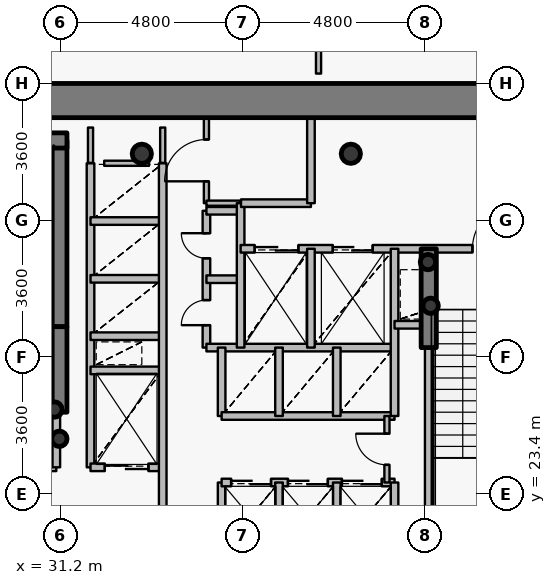
"""IFC4 building model, lengths in metres.
Left out: names, types, materials, properties, quantities, classifications, styles, units other than length and angle.
Written with IfcOpenShell. Run it as: python <this file> out.ifc"""

import sys

from ifc_helpers import new_model, si_unit, direction, frame, frame_2d, origin, origin_2d, place, context, subcontext, project, spatial, rectangle, hollow_circle, extrude, source, transform, mapped, element, fill, save


model = new_model("IFC4")
c1 = context("Model", 3, precision=1e-05, world=origin(), true_north=direction((0.0, 1.0)))
c2 = subcontext(c1, "Body", "Model", "MODEL_VIEW")
j1 = project(units=[si_unit("LENGTHUNIT", "METRE"), si_unit("PLANEANGLEUNIT", "RADIAN")], contexts=[c1])
p1 = place(None, origin())
s1 = spatial("IfcSite", under=j1, at=p1, CompositionType="ELEMENT")
p2 = place(p1, origin())
s2 = spatial("IfcBuilding", under=s1, at=p2, CompositionType="ELEMENT")
p3 = place(p2, frame((0.0, 0.0, 40.8)))
s3 = spatial("IfcBuildingStorey", under=s2, at=p3, CompositionType="ELEMENT", Elevation=40.8)
for number, where, z_axis, x_axis in (
    (1, (38.85, 32.35, 0.0), (0.0, 0.0, 1.0), (1.0, 0.0, 0.0)),
    (2, (33.35, 32.35, 0.0), (0.0, 0.0, 1.0), (1.0, 0.0, 0.0)),
):
    element("IfcColumn", number, at=place(p3, frame(where, z_axis=z_axis, x_axis=x_axis)), inside=s3, PredefinedType="COLUMN", context=c2, shape_type="SweptSolid", body=[
        extrude(hollow_circle(Radius=0.254, WallThickness=0.02, at=origin_2d()), origin(), (0.0, 0.0, 1.0), 4.2),
    ])
p4 = place(p3, frame((31.18, 27.8, 0.0), z_axis=(0.0, 0.0, 1.0), x_axis=(0.0, 1.0, 0.0)))
e3 = element("IfcWall", 3, at=p4, inside=s3, PredefinedType="SHEAR", context=c2, shape_type="SweptSolid", body=[
    extrude(rectangle(XDim=4.9, YDim=0.4, at=frame_2d((2.45, 0.0))), origin(), (0.0, 0.0, 1.0), 4.2),
])
p5 = place(p3, frame((27.28, 32.7, 0.0), z_axis=(0.0, 0.0, 1.0), x_axis=(1.0, 0.0, 0.0)))
e4 = element("IfcWall", 4, at=p5, inside=s3, PredefinedType="SHEAR", context=c2, shape_type="SweptSolid", body=[
    extrude(rectangle(XDim=4.1, YDim=0.4, at=frame_2d((2.05, 0.0))), origin(), (0.0, 0.0, 1.0), 4.2),
])
for number, where, z_axis, x_axis in (
    (5, (31.05, 25.62, 0.0), (0.0, 0.0, 1.0), (1.0, 0.0, 0.0)),
    (6, (31.18, 24.85, 0.0), (0.0, 0.0, 1.0), (1.0, 0.0, 0.0)),
    (7, (40.95, 28.35, 0.0), (0.0, 0.0, 1.0), (1.0, 0.0, 0.0)),
    (8, (40.88, 29.5, 0.0), (0.0, 0.0, 1.0), (1.0, 0.0, 0.0)),
):
    element("IfcColumn", number, at=place(p3, frame(where, z_axis=z_axis, x_axis=x_axis)), inside=s3, PredefinedType="COLUMN", context=c2, shape_type="SweptSolid", body=[
        extrude(hollow_circle(Radius=0.203, WallThickness=0.016, at=origin_2d()), origin(), (0.0, 0.0, 1.0), 4.2),
    ])
p6 = place(p3, frame((26.75, 33.75, 0.0), z_axis=(0.0, 0.0, 1.0), x_axis=(1.0, 0.0, 0.0)))
e9 = element("IfcWall", 9, at=p6, inside=s3, PredefinedType="SHEAR", context=c2, shape_type="SweptSolid", body=[
    extrude(rectangle(XDim=18.5, YDim=0.9, at=frame_2d((9.25, 0.0))), origin(), (0.0, 0.0, 1.0), 3.4),
])
p7 = place(p3, frame((31.18, 25.55, 0.0), z_axis=(0.0, 0.0, 1.0), x_axis=(0.0, 1.0, 0.0)))
e10 = element("IfcWall", 10, at=p7, inside=s3, PredefinedType="SHEAR", context=c2, shape_type="SweptSolid", body=[
    extrude(rectangle(XDim=2.25, YDim=0.4, at=frame_2d((1.125, 0.0))), origin(), (0.0, 0.0, 1.0), 3.55),
])
p8 = place(p3, frame((40.9, 27.25, 0.0), z_axis=(0.0, 0.0, 1.0), x_axis=(0.0, 1.0, 0.0)))
e11 = element("IfcWall", 11, at=p8, inside=s3, PredefinedType="SHEAR", context=c2, shape_type="SweptSolid", body=[
    extrude(rectangle(XDim=2.6, YDim=0.4, at=frame_2d((1.3, 0.0))), origin(), (0.0, 0.0, 1.0), 3.55),
])
p9 = place(p3, frame((27.56, 24.1, 0.0), z_axis=(0.0, 0.0, 1.0), x_axis=(1.0, 0.0, 0.0)))
e12 = element("IfcWall", 12, at=p9, inside=s3, PredefinedType="PARTITIONING", context=c2, shape_type="SweptSolid", body=[
    extrude(rectangle(XDim=3.54, YDim=0.2, at=frame_2d((1.77, 0.0))), origin(), (0.0, 0.0, 1.0), 3.95),
])
p10 = place(p9, frame((1.17, 0.0, 0.0)))
e13 = element("IfcOpeningElement", 13, at=p10, cuts=e12, PredefinedType="OPENING", context=c2, shape_type="SweptSolid", body=[
    extrude(rectangle(XDim=1.2, YDim=2.15, at=origin_2d()), frame((0.6, 0.11, 1.075), z_axis=(0.0, -1.0, 0.0), x_axis=(1.0, 0.0, 0.0)), (0.0, 0.0, 1.0), 0.22),
])
p11 = place(p3, frame((31.1, 24.1, 0.0), z_axis=(0.0, 0.0, 1.0), x_axis=(0.0, 1.0, 0.0)))
e14 = element("IfcWall", 14, at=p11, inside=s3, PredefinedType="PARTITIONING", context=c2, shape_type="SweptSolid", body=[
    extrude(rectangle(XDim=1.44, YDim=0.2, at=frame_2d((0.72, 0.0))), origin(), (0.0, 0.0, 1.0), 3.95),
])
p12 = place(p3, frame((32.0, 24.1, 0.0), z_axis=(0.0, 0.0, 1.0), x_axis=(0.0, 1.0, 0.0)))
e15 = element("IfcWall", 15, at=p12, inside=s3, PredefinedType="PARTITIONING", context=c2, shape_type="SweptSolid", body=[
    extrude(rectangle(XDim=8.0, YDim=0.2, at=frame_2d((4.0, 0.0))), origin(), (0.0, 0.0, 1.0), 3.95),
])
p13 = place(p3, frame((32.0, 24.1, 0.0), z_axis=(0.0, 0.0, 1.0), x_axis=(1.0, 0.0, 0.0)))
e16 = element("IfcWall", 16, at=p13, inside=s3, PredefinedType="PARTITIONING", context=c2, shape_type="SweptSolid", body=[
    extrude(rectangle(XDim=1.9, YDim=0.2, at=frame_2d((0.95, 0.0))), origin(), (0.0, 0.0, 1.0), 3.535),
])
p14 = place(p13, frame((0.375, 0.0, 0.0)))
e17 = element("IfcOpeningElement", 17, at=p14, cuts=e16, PredefinedType="OPENING", context=c2, shape_type="SweptSolid", body=[
    extrude(rectangle(XDim=1.15, YDim=2.15, at=origin_2d()), frame((0.575, 0.11, 1.075), z_axis=(0.0, -1.0, 0.0), x_axis=(1.0, 0.0, 0.0)), (0.0, 0.0, 1.0), 0.22),
])
for number, where, z_axis, x_axis in (
    (18, (32.0, 26.65, 0.0), (0.0, 0.0, 1.0), (1.0, 0.0, 0.0)),
    (19, (32.0, 27.55, 0.0), (0.0, 0.0, 1.0), (1.0, 0.0, 0.0)),
    (20, (32.0, 29.06, 0.0), (0.0, 0.0, 1.0), (1.0, 0.0, 0.0)),
    (21, (32.0, 30.58, 0.0), (0.0, 0.0, 1.0), (1.0, 0.0, 0.0)),
):
    element("IfcWall", number, at=place(p3, frame(where, z_axis=z_axis, x_axis=x_axis)), inside=s3, PredefinedType="PARTITIONING", context=c2, shape_type="SweptSolid", body=[
        extrude(rectangle(XDim=1.9, YDim=0.2, at=frame_2d((0.95, 0.0))), origin(), (0.0, 0.0, 1.0), 3.535),
    ])
p15 = place(p3, frame((33.9, 20.7, 0.0), z_axis=(0.0, 0.0, 1.0), x_axis=(0.0, 1.0, 0.0)))
e22 = element("IfcWall", 22, at=p15, inside=s3, PredefinedType="PARTITIONING", context=c2, shape_type="SweptSolid", body=[
    extrude(rectangle(XDim=11.4, YDim=0.2, at=frame_2d((5.7, 0.0))), origin(), (0.0, 0.0, 1.0), 3.535),
])
p16 = place(p3, frame((35.05, 27.25, 0.0), z_axis=(0.0, 0.0, 1.0), x_axis=(0.0, 1.0, 0.0)))
e23 = element("IfcWall", 23, at=p16, inside=s3, PredefinedType="PARTITIONING", context=c2, shape_type="SweptSolid", body=[
    extrude(rectangle(XDim=3.6, YDim=0.2, at=frame_2d((1.8, 0.0))), origin(), (0.0, 0.0, 1.0), 3.95),
])
p17 = place(p16, frame((0.59, 0.0, 0.0)))
e24 = element("IfcOpeningElement", 24, at=p17, cuts=e23, PredefinedType="OPENING", context=c2, shape_type="SweptSolid", body=[
    extrude(rectangle(XDim=0.66, YDim=2.05, at=origin_2d()), frame((0.33, 0.11, 1.025), z_axis=(0.0, -1.0, 0.0), x_axis=(1.0, 0.0, 0.0)), (0.0, 0.0, 1.0), 0.22),
])
p18 = place(p16, frame((2.35, 0.0, 0.0)))
e25 = element("IfcOpeningElement", 25, at=p18, cuts=e23, PredefinedType="OPENING", context=c2, shape_type="SweptSolid", body=[
    extrude(rectangle(XDim=0.66, YDim=2.05, at=origin_2d()), frame((0.33, 0.11, 1.025), z_axis=(0.0, -1.0, 0.0), x_axis=(1.0, 0.0, 0.0)), (0.0, 0.0, 1.0), 0.22),
])
p19 = place(p3, frame((35.05, 27.25, 0.0), z_axis=(0.0, 0.0, 1.0), x_axis=(1.0, 0.0, 0.0)))
e26 = element("IfcWall", 26, at=p19, inside=s3, PredefinedType="PARTITIONING", context=c2, shape_type="SweptSolid", body=[
    extrude(rectangle(XDim=4.95, YDim=0.2, at=frame_2d((2.475, 0.0))), origin(), (0.0, 0.0, 1.0), 3.535),
])
for number, where, z_axis, x_axis in (
    (27, (35.05, 29.05, 0.0), (0.0, 0.0, 1.0), (1.0, 0.0, 0.0)),
    (28, (35.05, 30.85, 0.0), (0.0, 0.0, 1.0), (1.0, 0.0, 0.0)),
):
    element("IfcWall", number, at=place(p3, frame(where, z_axis=z_axis, x_axis=x_axis)), inside=s3, PredefinedType="PARTITIONING", context=c2, shape_type="SweptSolid", body=[
        extrude(rectangle(XDim=0.9, YDim=0.2, at=frame_2d((0.45, 0.0))), origin(), (0.0, 0.0, 1.0), 3.95),
    ])
p20 = place(p3, frame((35.05, 31.05, 0.0), z_axis=(0.0, 0.0, 1.0), x_axis=(0.0, 1.0, 0.0)))
e29 = element("IfcWall", 29, at=p20, inside=s3, PredefinedType="PARTITIONING", context=c2, shape_type="SweptSolid", body=[
    extrude(rectangle(XDim=2.25, YDim=0.135, at=frame_2d((1.125, 0.0))), origin(), (0.0, 0.0, 1.0), 3.535),
])
p21 = place(p20, frame((0.575, 0.0, 0.0)))
e30 = element("IfcOpeningElement", 30, at=p21, cuts=e29, PredefinedType="OPENING", context=c2, shape_type="SweptSolid", body=[
    extrude(rectangle(XDim=1.1, YDim=2.15, at=origin_2d()), frame((0.55, 0.078, 1.075), z_axis=(0.0, -1.0, 0.0), x_axis=(1.0, 0.0, 0.0)), (0.0, 0.0, 1.0), 0.155),
])
p22 = place(p3, frame((35.05, 31.05, 0.0), z_axis=(0.0, 0.0, 1.0), x_axis=(1.0, 0.0, 0.0)))
e31 = element("IfcWall", 31, at=p22, inside=s3, PredefinedType="PARTITIONING", context=c2, shape_type="SweptSolid", body=[
    extrude(rectangle(XDim=0.9, YDim=0.135, at=frame_2d((0.45, 0.0))), origin(), (0.0, 0.0, 1.0), 3.95),
])
p23 = place(p3, frame((35.45, 21.9, 0.0), z_axis=(0.0, 0.0, 1.0), x_axis=(0.0, 1.0, 0.0)))
e32 = element("IfcWall", 32, at=p23, inside=s3, PredefinedType="PARTITIONING", context=c2, shape_type="SweptSolid", body=[
    extrude(rectangle(XDim=1.8, YDim=0.2, at=frame_2d((0.9, 0.0))), origin(), (0.0, 0.0, 1.0), 3.95),
])
p24 = place(p3, frame((35.45, 23.7, 0.0), z_axis=(0.0, 0.0, 1.0), x_axis=(1.0, 0.0, 0.0)))
e33 = element("IfcWall", 33, at=p24, inside=s3, PredefinedType="PARTITIONING", context=c2, shape_type="SweptSolid", body=[
    extrude(rectangle(XDim=4.55, YDim=0.2, at=frame_2d((2.275, 0.0))), origin(), (0.0, 0.0, 1.0), 3.535),
])
p25 = place(p24, frame((0.25, 0.0, 0.0)))
e34 = element("IfcOpeningElement", 34, at=p25, cuts=e33, PredefinedType="OPENING", context=c2, shape_type="SweptSolid", body=[
    extrude(rectangle(XDim=1.05, YDim=2.15, at=origin_2d()), frame((0.525, 0.11, 1.075), z_axis=(0.0, -1.0, 0.0), x_axis=(1.0, 0.0, 0.0)), (0.0, 0.0, 1.0), 0.22),
])
p26 = place(p24, frame((1.745, 0.0, 0.0)))
e35 = element("IfcOpeningElement", 35, at=p26, cuts=e33, PredefinedType="OPENING", context=c2, shape_type="SweptSolid", body=[
    extrude(rectangle(XDim=1.05, YDim=2.15, at=origin_2d()), frame((0.525, 0.11, 1.075), z_axis=(0.0, -1.0, 0.0), x_axis=(1.0, 0.0, 0.0)), (0.0, 0.0, 1.0), 0.22),
])
p27 = place(p24, frame((3.165, 0.0, 0.0)))
e36 = element("IfcOpeningElement", 36, at=p27, cuts=e33, PredefinedType="OPENING", context=c2, shape_type="SweptSolid", body=[
    extrude(rectangle(XDim=1.05, YDim=2.15, at=origin_2d()), frame((0.525, 0.11, 1.075), z_axis=(0.0, -1.0, 0.0), x_axis=(1.0, 0.0, 0.0)), (0.0, 0.0, 1.0), 0.22),
])
p28 = place(p3, frame((35.45, 25.45, 0.0), z_axis=(0.0, 0.0, 1.0), x_axis=(0.0, 1.0, 0.0)))
e37 = element("IfcWall", 37, at=p28, inside=s3, PredefinedType="PARTITIONING", context=c2, shape_type="SweptSolid", body=[
    extrude(rectangle(XDim=1.8, YDim=0.2, at=frame_2d((0.9, 0.0))), origin(), (0.0, 0.0, 1.0), 3.95),
])
p29 = place(p3, frame((35.45, 25.45, 0.0), z_axis=(0.0, 0.0, 1.0), x_axis=(1.0, 0.0, 0.0)))
e38 = element("IfcWall", 38, at=p29, inside=s3, PredefinedType="PARTITIONING", context=c2, shape_type="SweptSolid", body=[
    extrude(rectangle(XDim=4.55, YDim=0.2, at=frame_2d((2.275, 0.0))), origin(), (0.0, 0.0, 1.0), 3.535),
])
p30 = place(p3, frame((35.95, 27.25, 0.0), z_axis=(0.0, 0.0, 1.0), x_axis=(0.0, 1.0, 0.0)))
e39 = element("IfcWall", 39, at=p30, inside=s3, PredefinedType="PARTITIONING", context=c2, shape_type="SweptSolid", body=[
    extrude(rectangle(XDim=3.8, YDim=0.2, at=frame_2d((1.9, 0.0))), origin(), (0.0, 0.0, 1.0), 3.95),
])
p31 = place(p3, frame((35.95, 29.85, 0.0), z_axis=(0.0, 0.0, 1.0), x_axis=(1.0, 0.0, 0.0)))
e40 = element("IfcWall", 40, at=p31, inside=s3, PredefinedType="PARTITIONING", context=c2, shape_type="SweptSolid", body=[
    extrude(rectangle(XDim=8.49, YDim=0.2, at=frame_2d((4.245, 0.0))), origin(), (0.0, 0.0, 1.0), 3.535),
])
p32 = place(p31, frame((6.1, 0.0, 0.0)))
e41 = element("IfcOpeningElement", 41, at=p32, cuts=e40, PredefinedType="OPENING", context=c2, shape_type="SweptSolid", body=[
    extrude(rectangle(XDim=1.2, YDim=2.15, at=origin_2d()), frame((0.6, 0.11, 1.075), z_axis=(0.0, -1.0, 0.0), x_axis=(1.0, 0.0, 0.0)), (0.0, 0.0, 1.0), 0.22),
])
p33 = place(p31, frame((0.37, 0.0, 0.0)))
e42 = element("IfcOpeningElement", 42, at=p33, cuts=e40, PredefinedType="OPENING", context=c2, shape_type="SweptSolid", body=[
    extrude(rectangle(XDim=1.15, YDim=2.15, at=origin_2d()), frame((0.575, 0.11, 1.075), z_axis=(0.0, -1.0, 0.0), x_axis=(1.0, 0.0, 0.0)), (0.0, 0.0, 1.0), 0.22),
])
p34 = place(p31, frame((2.425, 0.0, 0.0)))
e43 = element("IfcOpeningElement", 43, at=p34, cuts=e40, PredefinedType="OPENING", context=c2, shape_type="SweptSolid", body=[
    extrude(rectangle(XDim=1.05, YDim=2.15, at=origin_2d()), frame((0.525, 0.11, 1.075), z_axis=(0.0, -1.0, 0.0), x_axis=(1.0, 0.0, 0.0)), (0.0, 0.0, 1.0), 0.22),
])
p35 = place(p3, frame((35.96, 31.05, 0.0), z_axis=(0.0, 0.0, 1.0), x_axis=(1.0, 0.0, 0.0)))
e44 = element("IfcWall", 44, at=p35, inside=s3, PredefinedType="PARTITIONING", context=c2, shape_type="SweptSolid", body=[
    extrude(rectangle(XDim=1.84, YDim=0.2, at=frame_2d((0.92, 0.0))), origin(), (0.0, 0.0, 1.0), 3.95),
])
for number, where, z_axis, x_axis in (
    (45, (36.96, 21.9, 0.0), (0.0, 0.0, 1.0), (0.0, 1.0, 0.0)),
    (46, (36.96, 25.45, 0.0), (0.0, 0.0, 1.0), (0.0, 1.0, 0.0)),
):
    element("IfcWall", number, at=place(p3, frame(where, z_axis=z_axis, x_axis=x_axis)), inside=s3, PredefinedType="PARTITIONING", context=c2, shape_type="SweptSolid", body=[
        extrude(rectangle(XDim=1.8, YDim=0.2, at=frame_2d((0.9, 0.0))), origin(), (0.0, 0.0, 1.0), 3.95),
    ])
p36 = place(p3, frame((37.8, 27.25, 0.0), z_axis=(0.0, 0.0, 1.0), x_axis=(0.0, 1.0, 0.0)))
e47 = element("IfcWall", 47, at=p36, inside=s3, PredefinedType="PARTITIONING", context=c2, shape_type="SweptSolid", body=[
    extrude(rectangle(XDim=2.6, YDim=0.2, at=frame_2d((1.3, 0.0))), origin(), (0.0, 0.0, 1.0), 3.95),
])
p37 = place(p3, frame((37.8, 31.05, 0.0), z_axis=(0.0, 0.0, 1.0), x_axis=(0.0, 1.0, 0.0)))
e48 = element("IfcWall", 48, at=p37, inside=s3, PredefinedType="PARTITIONING", context=c2, shape_type="SweptSolid", body=[
    extrude(rectangle(XDim=2.25, YDim=0.2, at=frame_2d((1.125, 0.0))), origin(), (0.0, 0.0, 1.0), 3.535),
])
for number, where, z_axis, x_axis in (
    (49, (38.48, 21.9, 0.0), (0.0, 0.0, 1.0), (0.0, 1.0, 0.0)),
    (50, (38.48, 25.45, 0.0), (0.0, 0.0, 1.0), (0.0, 1.0, 0.0)),
):
    element("IfcWall", number, at=place(p3, frame(where, z_axis=z_axis, x_axis=x_axis)), inside=s3, PredefinedType="PARTITIONING", context=c2, shape_type="SweptSolid", body=[
        extrude(rectangle(XDim=1.8, YDim=0.2, at=frame_2d((0.9, 0.0))), origin(), (0.0, 0.0, 1.0), 3.95),
    ])
p38 = place(p3, frame((39.8, 23.7, 0.0), z_axis=(0.0, 0.0, 1.0), x_axis=(0.0, 1.0, 0.0)))
e51 = element("IfcWall", 51, at=p38, inside=s3, PredefinedType="PARTITIONING", context=c2, shape_type="SweptSolid", body=[
    extrude(rectangle(XDim=1.75, YDim=0.135, at=frame_2d((0.875, 0.0))), origin(), (0.0, 0.0, 1.0), 3.95),
])
p39 = place(p38, frame((0.465, 0.0, 0.0)))
e52 = element("IfcOpeningElement", 52, at=p39, cuts=e51, PredefinedType="OPENING", context=c2, shape_type="SweptSolid", body=[
    extrude(rectangle(XDim=0.82, YDim=2.1, at=origin_2d()), frame((0.41, 0.078, 1.05), z_axis=(0.0, -1.0, 0.0), x_axis=(1.0, 0.0, 0.0)), (0.0, 0.0, 1.0), 0.155),
])
p40 = place(p3, frame((40.0, 21.9, 0.0), z_axis=(0.0, 0.0, 1.0), x_axis=(0.0, 1.0, 0.0)))
e53 = element("IfcWall", 53, at=p40, inside=s3, PredefinedType="PARTITIONING", context=c2, shape_type="SweptSolid", body=[
    extrude(rectangle(XDim=1.8, YDim=0.2, at=frame_2d((0.9, 0.0))), origin(), (0.0, 0.0, 1.0), 3.95),
])
p41 = place(p3, frame((40.0, 25.45, 0.0), z_axis=(0.0, 0.0, 1.0), x_axis=(0.0, 1.0, 0.0)))
e54 = element("IfcWall", 54, at=p41, inside=s3, PredefinedType="PARTITIONING", context=c2, shape_type="SweptSolid", body=[
    extrude(rectangle(XDim=4.4, YDim=0.2, at=frame_2d((2.2, 0.0))), origin(), (0.0, 0.0, 1.0), 3.95),
])
p42 = place(p3, frame((40.0, 27.85, 0.0), z_axis=(0.0, 0.0, 1.0), x_axis=(1.0, 0.0, 0.0)))
e55 = element("IfcWall", 55, at=p42, inside=s3, PredefinedType="PARTITIONING", context=c2, shape_type="SweptSolid", body=[
    extrude(rectangle(XDim=0.9, YDim=0.2, at=frame_2d((0.45, 0.0))), origin(), (0.0, 0.0, 1.0), 3.95),
])
p43 = place(p3, frame((40.9, 21.33, 0.0), z_axis=(0.0, 0.0, 1.0), x_axis=(0.0, 1.0, 0.0)))
e56 = element("IfcWall", 56, at=p43, inside=s3, PredefinedType="PARTITIONING", context=c2, shape_type="SweptSolid", body=[
    extrude(rectangle(XDim=5.91, YDim=0.2, at=frame_2d((2.955, 0.0))), origin(), (0.0, 0.0, 1.0), 3.485),
])
p44 = place(p3, frame((32.36, 32.1, 0.0), z_axis=(0.0, 0.0, 1.0), x_axis=(1.0, 0.0, 0.0)))
e57 = element("IfcWall", 57, at=p44, inside=s3, PredefinedType="PARTITIONING", context=c2, shape_type="SweptSolid", body=[
    extrude(rectangle(XDim=1.18, YDim=0.135, at=frame_2d((0.59, 0.0))), origin(), (0.0, 0.0, 1.0), 3.535),
])
p45 = place(p3, frame((32.0, 33.04, 0.0), z_axis=(0.0, 0.0, 1.0), x_axis=(0.0, -1.0, 0.0)))
e58 = element("IfcWall", 58, at=p45, inside=s3, PredefinedType="PARTITIONING", context=c2, shape_type="SweptSolid", body=[
    extrude(rectangle(XDim=0.93, YDim=0.135, at=frame_2d((0.465, 0.0))), origin(), (0.0, 0.0, 1.0), 3.485),
])
p46 = place(p3, frame((33.9, 32.11, 0.0), z_axis=(0.0, 0.0, 1.0), x_axis=(0.0, 1.0, 0.0)))
e59 = element("IfcWall", 59, at=p46, inside=s3, PredefinedType="PARTITIONING", context=c2, shape_type="SweptSolid", body=[
    extrude(rectangle(XDim=0.93, YDim=0.135, at=frame_2d((0.465, 0.0))), origin(), (0.0, 0.0, 1.0), 3.535),
])
p47 = place(p3, frame((38.0, 34.46, 0.0), z_axis=(0.0, 0.0, 1.0), x_axis=(0.0, 1.0, 0.0)))
e60 = element("IfcWall", 60, at=p47, inside=s3, PredefinedType="PARTITIONING", context=c2, shape_type="SweptSolid", body=[
    extrude(rectangle(XDim=1.64, YDim=0.135, at=frame_2d((0.82, 0.0))), origin(), (0.0, 0.0, 1.0), 3.95),
])
m1 = source(origin(), c2, "Body", "SweptSolid", [
    extrude(rectangle(XDim=1.2, YDim=2.15, at=origin_2d()), frame((0.6, 0.025, 1.075), z_axis=(0.0, -1.0, 0.0), x_axis=(1.0, 0.0, 0.0)), (0.0, 0.0, 1.0), 0.05),
])
p48 = place(p32, origin())
e61 = element("IfcDoor", 61, at=p48, inside=s3, OperationType="SINGLE_SWING_RIGHT", PredefinedType="DOOR", context=c2, shape_type="MappedRepresentation", body=[
    mapped(m1, transform((0.0, 0.0, 0.0), x_axis=(1.0, 0.0, 0.0), y_axis=(0.0, 1.0, 0.0), z_axis=(0.0, 0.0, 1.0), scale=1.0)),
])
fill(e41, e61)
m2 = source(origin(), c2, "Body", "SweptSolid", [
    extrude(rectangle(XDim=1.15, YDim=2.15, at=origin_2d()), frame((0.575, 0.025, 1.075), z_axis=(0.0, -1.0, 0.0), x_axis=(1.0, 0.0, 0.0)), (0.0, 0.0, 1.0), 0.05),
])
p49 = place(p33, origin())
e62 = element("IfcDoor", 62, at=p49, inside=s3, OperationType="DOUBLE_DOOR_SLIDING", PredefinedType="USERDEFINED", context=c2, shape_type="MappedRepresentation", body=[
    mapped(m2, transform((0.0, 0.0, 0.0), x_axis=(1.0, 0.0, 0.0), y_axis=(0.0, 1.0, 0.0), z_axis=(0.0, 0.0, 1.0), scale=1.0)),
])
fill(e42, e62)
p50 = place(p14, origin())
e63 = element("IfcDoor", 63, at=p50, inside=s3, OperationType="DOUBLE_DOOR_SLIDING", PredefinedType="USERDEFINED", context=c2, shape_type="MappedRepresentation", body=[
    mapped(m2, transform((0.0, 0.0, 0.0), x_axis=(1.0, 0.0, 0.0), y_axis=(0.0, 1.0, 0.0), z_axis=(0.0, 0.0, 1.0), scale=1.0)),
])
fill(e17, e63)
m3 = source(origin(), c2, "Body", "SweptSolid", [
    extrude(rectangle(XDim=1.05, YDim=2.15, at=origin_2d()), frame((0.525, 0.025, 1.075), z_axis=(0.0, -1.0, 0.0), x_axis=(1.0, 0.0, 0.0)), (0.0, 0.0, 1.0), 0.05),
])
p51 = place(p34, origin())
e64 = element("IfcDoor", 64, at=p51, inside=s3, OperationType="DOUBLE_DOOR_SLIDING", PredefinedType="USERDEFINED", context=c2, shape_type="MappedRepresentation", body=[
    mapped(m3, transform((0.0, 0.0, 0.0), x_axis=(1.0, 0.0, 0.0), y_axis=(0.0, 1.0, 0.0), z_axis=(0.0, 0.0, 1.0), scale=1.0)),
])
fill(e43, e64)
p52 = place(p25, origin())
e65 = element("IfcDoor", 65, at=p52, inside=s3, OperationType="DOUBLE_DOOR_SLIDING", PredefinedType="USERDEFINED", context=c2, shape_type="MappedRepresentation", body=[
    mapped(m3, transform((0.0, 0.0, 0.0), x_axis=(1.0, 0.0, 0.0), y_axis=(0.0, 1.0, 0.0), z_axis=(0.0, 0.0, 1.0), scale=1.0)),
])
fill(e34, e65)
p53 = place(p26, origin())
e66 = element("IfcDoor", 66, at=p53, inside=s3, OperationType="DOUBLE_DOOR_SLIDING", PredefinedType="USERDEFINED", context=c2, shape_type="MappedRepresentation", body=[
    mapped(m3, transform((0.0, 0.0, 0.0), x_axis=(1.0, 0.0, 0.0), y_axis=(0.0, 1.0, 0.0), z_axis=(0.0, 0.0, 1.0), scale=1.0)),
])
fill(e35, e66)
p54 = place(p27, origin())
e67 = element("IfcDoor", 67, at=p54, inside=s3, OperationType="DOUBLE_DOOR_SLIDING", PredefinedType="USERDEFINED", context=c2, shape_type="MappedRepresentation", body=[
    mapped(m3, transform((0.0, 0.0, 0.0), x_axis=(1.0, 0.0, 0.0), y_axis=(0.0, 1.0, 0.0), z_axis=(0.0, 0.0, 1.0), scale=1.0)),
])
fill(e36, e67)
m4 = source(origin(), c2, "Body", "SweptSolid", [
    extrude(rectangle(XDim=0.66, YDim=2.05, at=origin_2d()), frame((0.33, 0.025, 1.025), z_axis=(0.0, -1.0, 0.0), x_axis=(1.0, 0.0, 0.0)), (0.0, 0.0, 1.0), 0.05),
])
p55 = place(p17, origin())
e68 = element("IfcDoor", 68, at=p55, inside=s3, OperationType="SINGLE_SWING_LEFT", PredefinedType="USERDEFINED", context=c2, shape_type="MappedRepresentation", body=[
    mapped(m4, transform((0.0, 0.0, 0.0), x_axis=(1.0, 0.0, 0.0), y_axis=(0.0, 1.0, 0.0), z_axis=(0.0, 0.0, 1.0), scale=1.0)),
])
fill(e24, e68)
p56 = place(p18, origin())
e69 = element("IfcDoor", 69, at=p56, inside=s3, OperationType="SINGLE_SWING_RIGHT", PredefinedType="USERDEFINED", context=c2, shape_type="MappedRepresentation", body=[
    mapped(m4, transform((0.0, 0.0, 0.0), x_axis=(1.0, 0.0, 0.0), y_axis=(0.0, 1.0, 0.0), z_axis=(0.0, 0.0, 1.0), scale=1.0)),
])
fill(e25, e69)
m5 = source(origin(), c2, "Body", "SweptSolid", [
    extrude(rectangle(XDim=1.1, YDim=2.15, at=origin_2d()), frame((0.55, 0.025, 1.075), z_axis=(0.0, -1.0, 0.0), x_axis=(1.0, 0.0, 0.0)), (0.0, 0.0, 1.0), 0.05),
])
p57 = place(p21, origin())
e70 = element("IfcDoor", 70, at=p57, inside=s3, OperationType="SINGLE_SWING_LEFT", PredefinedType="DOOR", context=c2, shape_type="MappedRepresentation", body=[
    mapped(m5, transform((0.0, 0.0, 0.0), x_axis=(1.0, 0.0, 0.0), y_axis=(0.0, 1.0, 0.0), z_axis=(0.0, 0.0, 1.0), scale=1.0)),
])
fill(e30, e70)
m6 = source(origin(), c2, "Body", "SweptSolid", [
    extrude(rectangle(XDim=0.82, YDim=2.1, at=origin_2d()), frame((0.41, 0.025, 1.05), z_axis=(0.0, -1.0, 0.0), x_axis=(1.0, 0.0, 0.0)), (0.0, 0.0, 1.0), 0.05),
])
p58 = place(p39, origin())
e71 = element("IfcDoor", 71, at=p58, inside=s3, OperationType="SINGLE_SWING_RIGHT", PredefinedType="DOOR", context=c2, shape_type="MappedRepresentation", body=[
    mapped(m6, transform((0.0, 0.0, 0.0), x_axis=(1.0, 0.0, 0.0), y_axis=(0.0, 1.0, 0.0), z_axis=(0.0, 0.0, 1.0), scale=1.0)),
])
fill(e52, e71)
save(model, sys.argv[1])
